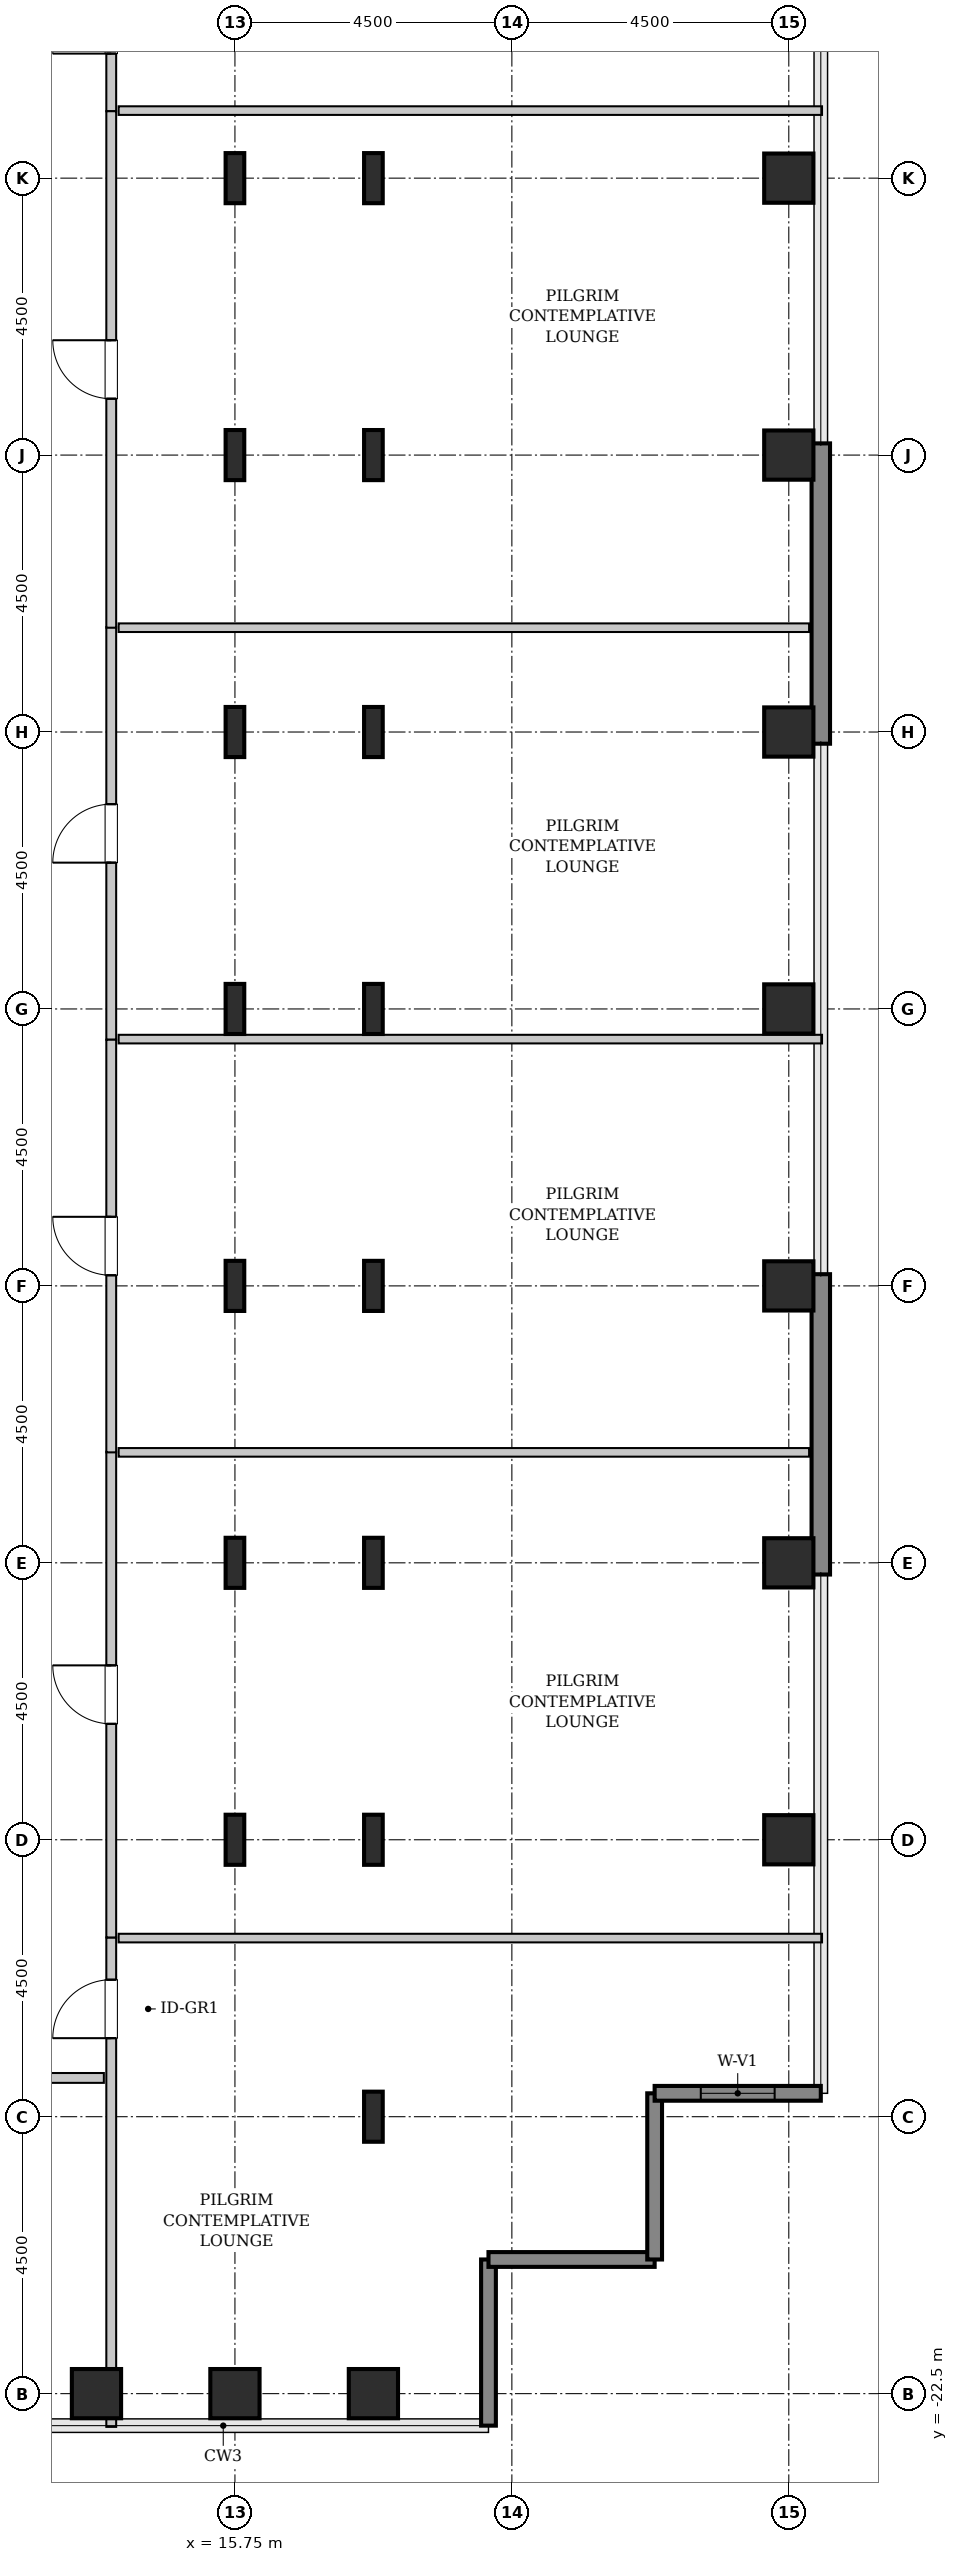
"""IFC4 building model, lengths in metres.
Left out: names, types, materials, properties, quantities, classifications, styles, units other than length and angle.
Written with IfcOpenShell. Run it as: python <this file> out.ifc"""

import sys

from ifc_helpers import new_model, si_unit, direction, frame, frame_2d, origin, origin_2d, place, context, subcontext, project, spatial, rectangle, hollow_rectangle, i_section, extrude, source, transform, mapped, element, fill, save


model = new_model("IFC4")
c1 = context("Model", 3, precision=1e-05, world=origin(), true_north=direction((0.0, 1.0)))
c2 = subcontext(c1, "Body", "Model", "MODEL_VIEW")
j1 = project(units=[si_unit("LENGTHUNIT", "METRE"), si_unit("PLANEANGLEUNIT", "RADIAN")], contexts=[c1])
p1 = place(None, origin())
s1 = spatial("IfcSite", under=j1, at=p1, CompositionType="ELEMENT")
p2 = place(p1, origin())
s2 = spatial("IfcBuilding", under=s1, at=p2, CompositionType="ELEMENT")
p3 = place(p2, frame((0.0, 0.0, 160.2)))
s3 = spatial("IfcBuildingStorey", under=s2, at=p3, CompositionType="ELEMENT", Elevation=160.2)
m1 = source(origin(), c2, "Body", "SweptSolid", [
    extrude(hollow_rectangle(XDim=0.8, YDim=0.8, WallThickness=0.04, InnerFilletRadius=0.04, OuterFilletRadius=0.08, at=origin_2d()), origin(), (0.0, 0.0, 1.0), 3.8),
])
for number, where, z_axis, x_axis in (
    (1, (13.5, -22.5, 0.0), (0.0, 0.0, 1.0), (1.0, 0.0, 0.0)),
    (2, (15.75, -22.5, 0.0), (0.0, 0.0, 1.0), (1.0, 0.0, 0.0)),
):
    element("IfcColumn", number, at=place(p3, frame(where, z_axis=z_axis, x_axis=x_axis)), inside=s3, PredefinedType="COLUMN", context=c2, shape_type="MappedRepresentation", body=[
        mapped(m1, transform((0.0, 0.0, 0.0), x_axis=(1.0, 0.0, 0.0), y_axis=(0.0, 1.0, 0.0), z_axis=(0.0, 0.0, 1.0), scale=1.0)),
    ])
m2 = source(origin(), c2, "Body", "SweptSolid", [
    extrude(i_section(OverallWidth=0.303, OverallDepth=0.814, WebThickness=0.021, FlangeThickness=0.04, FilletRadius=0.03, at=origin_2d()), origin(), (0.0, 0.0, 1.0), 3.8),
])
for number, where, z_axis, x_axis in (
    (3, (15.75, -13.5, 0.0), (0.0, 0.0, 1.0), (1.0, 0.0, 0.0)),
    (4, (15.75, -9.0, 0.0), (0.0, 0.0, 1.0), (1.0, 0.0, 0.0)),
    (5, (15.75, -4.5, 0.0), (0.0, 0.0, 1.0), (1.0, 0.0, 0.0)),
    (6, (15.75, 0.0, 0.0), (0.0, 0.0, 1.0), (1.0, 0.0, 0.0)),
    (7, (15.75, 4.5, 0.0), (0.0, 0.0, 1.0), (1.0, 0.0, 0.0)),
    (8, (15.75, 9.0, 0.0), (0.0, 0.0, 1.0), (1.0, 0.0, 0.0)),
    (9, (15.75, 13.5, 0.0), (0.0, 0.0, 1.0), (1.0, 0.0, 0.0)),
):
    element("IfcColumn", number, at=place(p3, frame(where, z_axis=z_axis, x_axis=x_axis)), inside=s3, PredefinedType="COLUMN", context=c2, shape_type="MappedRepresentation", body=[
        mapped(m2, transform((0.0, 0.0, 0.0), x_axis=(1.0, 0.0, 0.0), y_axis=(0.0, 1.0, 0.0), z_axis=(0.0, 0.0, 1.0), scale=1.0)),
    ])
p4 = place(p3, frame((18.0, -22.5, 0.0), z_axis=(0.0, 0.0, 1.0), x_axis=(1.0, 0.0, 0.0)))
e10 = element("IfcColumn", 10, at=p4, inside=s3, PredefinedType="COLUMN", context=c2, shape_type="MappedRepresentation", body=[
    mapped(m1, transform((0.0, 0.0, 0.0), x_axis=(1.0, 0.0, 0.0), y_axis=(0.0, 1.0, 0.0), z_axis=(0.0, 0.0, 1.0), scale=1.0)),
])
for number, where, z_axis, x_axis in (
    (11, (18.0, -18.0, 0.0), (0.0, 0.0, 1.0), (1.0, 0.0, 0.0)),
    (12, (18.0, -13.5, 0.0), (0.0, 0.0, 1.0), (1.0, 0.0, 0.0)),
    (13, (18.0, -9.0, 0.0), (0.0, 0.0, 1.0), (1.0, 0.0, 0.0)),
    (14, (18.0, -4.5, 0.0), (0.0, 0.0, 1.0), (1.0, 0.0, 0.0)),
    (15, (18.0, 0.0, 0.0), (0.0, 0.0, 1.0), (1.0, 0.0, 0.0)),
    (16, (18.0, 4.5, 0.0), (0.0, 0.0, 1.0), (1.0, 0.0, 0.0)),
    (17, (18.0, 9.0, 0.0), (0.0, 0.0, 1.0), (1.0, 0.0, 0.0)),
    (18, (18.0, 13.5, 0.0), (0.0, 0.0, 1.0), (1.0, 0.0, 0.0)),
):
    element("IfcColumn", number, at=place(p3, frame(where, z_axis=z_axis, x_axis=x_axis)), inside=s3, PredefinedType="COLUMN", context=c2, shape_type="MappedRepresentation", body=[
        mapped(m2, transform((0.0, 0.0, 0.0), x_axis=(1.0, 0.0, 0.0), y_axis=(0.0, 1.0, 0.0), z_axis=(0.0, 0.0, 1.0), scale=1.0)),
    ])
for number, where, z_axis, x_axis in (
    (19, (24.75, -13.5, 0.0), (0.0, 0.0, 1.0), (1.0, 0.0, 0.0)),
    (20, (24.75, -9.0, 0.0), (0.0, 0.0, 1.0), (1.0, 0.0, 0.0)),
    (21, (24.75, -4.5, 0.0), (0.0, 0.0, 1.0), (1.0, 0.0, 0.0)),
    (22, (24.75, 0.0, 0.0), (0.0, 0.0, 1.0), (1.0, 0.0, 0.0)),
    (23, (24.75, 4.5, 0.0), (0.0, 0.0, 1.0), (1.0, 0.0, 0.0)),
    (24, (24.75, 9.0, 0.0), (0.0, 0.0, 1.0), (1.0, 0.0, 0.0)),
    (25, (24.75, 13.5, 0.0), (0.0, 0.0, 1.0), (1.0, 0.0, 0.0)),
):
    element("IfcColumn", number, at=place(p3, frame(where, z_axis=z_axis, x_axis=x_axis)), inside=s3, PredefinedType="COLUMN", context=c2, shape_type="MappedRepresentation", body=[
        mapped(m1, transform((0.0, 0.0, 0.0), x_axis=(1.0, 0.0, 0.0), y_axis=(0.0, 1.0, 0.0), z_axis=(0.0, 0.0, 1.0), scale=1.0)),
    ])
m3 = source(origin(), c2, "Body", "SweptSolid", [
    extrude(rectangle(XDim=4.88, YDim=0.3, at=frame_2d((2.44, 0.0))), origin(), (0.0, 0.0, 1.0), 3.55),
])
for number, where, z_axis, x_axis in (
    (26, (25.27, -9.19, 0.0), (0.0, 0.0, 1.0), (0.0, 1.0, 0.0)),
    (27, (25.27, 4.31, 0.0), (0.0, 0.0, 1.0), (0.0, 1.0, 0.0)),
):
    element("IfcWall", number, at=place(p3, frame(where, z_axis=z_axis, x_axis=x_axis)), inside=s3, PredefinedType="SHEAR", context=c2, shape_type="MappedRepresentation", body=[
        mapped(m3, transform((0.0, 0.0, 0.0), x_axis=(1.0, 0.0, 0.0), y_axis=(0.0, 1.0, 0.0), z_axis=(0.0, 0.0, 1.0), scale=1.0)),
    ])
m4 = source(origin(), c2, "Body", "SweptSolid", [
    extrude(rectangle(XDim=2.7, YDim=0.24, at=frame_2d((1.35, 0.0))), origin(), (0.0, 0.0, 1.0), 3.55),
])
for number, where, z_axis, x_axis in (
    (28, (19.87, -23.02, 0.0), (0.0, 0.0, 1.0), (0.0, 1.0, 0.0)),
    (29, (19.87, -20.32, 0.0), (0.0, 0.0, 1.0), (1.0, 0.0, 0.0)),
    (30, (22.57, -20.32, 0.0), (0.0, 0.0, 1.0), (0.0, 1.0, 0.0)),
):
    element("IfcWall", number, at=place(p3, frame(where, z_axis=z_axis, x_axis=x_axis)), inside=s3, PredefinedType="SHEAR", context=c2, shape_type="MappedRepresentation", body=[
        mapped(m4, transform((0.0, 0.0, 0.0), x_axis=(1.0, 0.0, 0.0), y_axis=(0.0, 1.0, 0.0), z_axis=(0.0, 0.0, 1.0), scale=1.0)),
    ])
p5 = place(p3, frame((22.57, -17.62, 0.0), z_axis=(0.0, 0.0, 1.0), x_axis=(1.0, 0.0, 0.0)))
e31 = element("IfcWall", 31, at=p5, inside=s3, PredefinedType="SHEAR", context=c2, shape_type="MappedRepresentation", body=[
    mapped(m4, transform((0.0, 0.0, 0.0), x_axis=(1.0, 0.0, 0.0), y_axis=(0.0, 1.0, 0.0), z_axis=(0.0, 0.0, 1.0), scale=1.0)),
])
p6 = place(p5, frame((0.75, 0.0, 0.85)))
e32 = element("IfcOpeningElement", 32, at=p6, cuts=e31, PredefinedType="OPENING", context=c2, shape_type="SweptSolid", body=[
    extrude(rectangle(XDim=1.2, YDim=1.8, at=frame_2d((0.6, 0.9))), frame((0.0, 0.13, 0.0), z_axis=(0.0, -1.0, 0.0), x_axis=(1.0, 0.0, 0.0)), (0.0, 0.0, 1.0), 0.26),
])
m5 = source(origin(), c2, "Body", "SweptSolid", [
    extrude(rectangle(XDim=7.953, YDim=0.16, at=frame_2d((3.976, 0.0))), origin(), (0.0, 0.0, 1.0), 3.535),
])
p7 = place(p3, frame((13.74, -23.04, 0.0), z_axis=(0.0, 0.0, 1.0), x_axis=(0.0, 1.0, 0.0)))
e33 = element("IfcWall", 33, at=p7, inside=s3, PredefinedType="PARTITIONING", context=c2, shape_type="MappedRepresentation", body=[
    mapped(m5, transform((0.0, 0.0, 0.0), x_axis=(1.0, 0.0, 0.0), y_axis=(0.0, 1.0, 0.0), z_axis=(0.0, 0.0, 1.0), scale=1.0)),
])
p8 = place(p7, frame((6.316, 0.0, 0.0)))
e34 = element("IfcOpeningElement", 34, at=p8, cuts=e33, PredefinedType="OPENING", context=c2, shape_type="SweptSolid", body=[
    extrude(rectangle(XDim=0.95, YDim=2.1, at=frame_2d((0.475, 1.05))), frame((0.0, 0.09, 0.0), z_axis=(0.0, -1.0, 0.0), x_axis=(1.0, 0.0, 0.0)), (0.0, 0.0, 1.0), 0.18),
])
m6 = source(origin(), c2, "Body", "SweptSolid", [
    extrude(rectangle(XDim=11.43, YDim=0.14, at=frame_2d((5.715, 0.0))), origin(), (0.0, 0.0, 1.0), 3.535),
])
p9 = place(p3, frame((13.86, -15.097, 0.0), z_axis=(0.0, 0.0, 1.0), x_axis=(1.0, 0.0, 0.0)))
e35 = element("IfcWall", 35, at=p9, inside=s3, PredefinedType="PARTITIONING", context=c2, shape_type="MappedRepresentation", body=[
    mapped(m6, transform((0.0, 0.0, 0.0), x_axis=(1.0, 0.0, 0.0), y_axis=(0.0, 1.0, 0.0), z_axis=(0.0, 0.0, 1.0), scale=1.0)),
])
m7 = source(origin(), c2, "Body", "SweptSolid", [
    extrude(rectangle(XDim=7.892, YDim=0.16, at=frame_2d((3.946, 0.0))), origin(), (0.0, 0.0, 1.0), 3.535),
])
p10 = place(p3, frame((13.74, -15.087, 0.0), z_axis=(0.0, 0.0, 1.0), x_axis=(0.0, 1.0, 0.0)))
e36 = element("IfcWall", 36, at=p10, inside=s3, PredefinedType="PARTITIONING", context=c2, shape_type="MappedRepresentation", body=[
    mapped(m7, transform((0.0, 0.0, 0.0), x_axis=(1.0, 0.0, 0.0), y_axis=(0.0, 1.0, 0.0), z_axis=(0.0, 0.0, 1.0), scale=1.0)),
])
p11 = place(p10, frame((3.471, 0.0, 0.0)))
e37 = element("IfcOpeningElement", 37, at=p11, cuts=e36, PredefinedType="OPENING", context=c2, shape_type="SweptSolid", body=[
    extrude(rectangle(XDim=0.95, YDim=2.1, at=frame_2d((0.475, 1.05))), frame((0.0, 0.09, 0.0), z_axis=(0.0, -1.0, 0.0), x_axis=(1.0, 0.0, 0.0)), (0.0, 0.0, 1.0), 0.18),
])
m8 = source(origin(), c2, "Body", "SweptSolid", [
    extrude(rectangle(XDim=11.22, YDim=0.14, at=frame_2d((5.61, 0.0))), origin(), (0.0, 0.0, 1.0), 3.535),
])
p12 = place(p3, frame((13.86, -7.205, 0.0), z_axis=(0.0, 0.0, 1.0), x_axis=(1.0, 0.0, 0.0)))
e38 = element("IfcWall", 38, at=p12, inside=s3, PredefinedType="PARTITIONING", context=c2, shape_type="MappedRepresentation", body=[
    mapped(m8, transform((0.0, 0.0, 0.0), x_axis=(1.0, 0.0, 0.0), y_axis=(0.0, 1.0, 0.0), z_axis=(0.0, 0.0, 1.0), scale=1.0)),
])
m9 = source(origin(), c2, "Body", "SweptSolid", [
    extrude(rectangle(XDim=6.705, YDim=0.16, at=frame_2d((3.353, 0.0))), origin(), (0.0, 0.0, 1.0), 3.535),
])
p13 = place(p3, frame((13.74, -0.5, 0.0), z_axis=(0.0, 0.0, 1.0), x_axis=(0.0, 1.0, 0.0)))
e39 = element("IfcWall", 39, at=p13, inside=s3, PredefinedType="PARTITIONING", context=c2, shape_type="MappedRepresentation", body=[
    mapped(m9, transform((0.0, 0.0, 0.0), x_axis=(1.0, 0.0, 0.0), y_axis=(0.0, 1.0, 0.0), z_axis=(0.0, 0.0, 1.0), scale=1.0)),
])
p14 = place(p13, frame((2.877, 0.0, 0.0)))
e40 = element("IfcOpeningElement", 40, at=p14, cuts=e39, PredefinedType="OPENING", context=c2, shape_type="SweptSolid", body=[
    extrude(rectangle(XDim=0.95, YDim=2.1, at=frame_2d((0.475, 1.05))), frame((0.0, 0.09, 0.0), z_axis=(0.0, -1.0, 0.0), x_axis=(1.0, 0.0, 0.0)), (0.0, 0.0, 1.0), 0.18),
])
p15 = place(p3, frame((13.86, 6.195, 0.0), z_axis=(0.0, 0.0, 1.0), x_axis=(1.0, 0.0, 0.0)))
e41 = element("IfcWall", 41, at=p15, inside=s3, PredefinedType="PARTITIONING", context=c2, shape_type="MappedRepresentation", body=[
    mapped(m8, transform((0.0, 0.0, 0.0), x_axis=(1.0, 0.0, 0.0), y_axis=(0.0, 1.0, 0.0), z_axis=(0.0, 0.0, 1.0), scale=1.0)),
])
m10 = source(origin(), c2, "Body", "SweptSolid", [
    extrude(rectangle(XDim=11.43, YDim=0.14, at=frame_2d((5.715, 0.0))), origin(), (0.0, 0.0, 1.0), 2.875),
])
p16 = place(p3, frame((13.86, -0.49, 0.0), z_axis=(0.0, 0.0, 1.0), x_axis=(1.0, 0.0, 0.0)))
e42 = element("IfcWall", 42, at=p16, inside=s3, PredefinedType="PARTITIONING", context=c2, shape_type="MappedRepresentation", body=[
    mapped(m10, transform((0.0, 0.0, 0.0), x_axis=(1.0, 0.0, 0.0), y_axis=(0.0, 1.0, 0.0), z_axis=(0.0, 0.0, 1.0), scale=1.0)),
])
p17 = place(p3, frame((13.74, -7.205, 0.0), z_axis=(0.0, 0.0, 1.0), x_axis=(0.0, 1.0, 0.0)))
e43 = element("IfcWall", 43, at=p17, inside=s3, PredefinedType="PARTITIONING", context=c2, shape_type="MappedRepresentation", body=[
    mapped(m9, transform((0.0, 0.0, 0.0), x_axis=(1.0, 0.0, 0.0), y_axis=(0.0, 1.0, 0.0), z_axis=(0.0, 0.0, 1.0), scale=1.0)),
])
p18 = place(p17, frame((2.877, 0.0, 0.0)))
e44 = element("IfcOpeningElement", 44, at=p18, cuts=e43, PredefinedType="OPENING", context=c2, shape_type="SweptSolid", body=[
    extrude(rectangle(XDim=0.95, YDim=2.1, at=frame_2d((0.475, 1.05))), frame((0.0, 0.09, 0.0), z_axis=(0.0, -1.0, 0.0), x_axis=(1.0, 0.0, 0.0)), (0.0, 0.0, 1.0), 0.18),
])
m11 = source(origin(), c2, "Body", "SweptSolid", [
    extrude(rectangle(XDim=8.453, YDim=0.16, at=frame_2d((4.226, 0.0))), origin(), (0.0, 0.0, 1.0), 3.535),
])
p19 = place(p3, frame((13.74, 14.587, 0.0), z_axis=(0.0, 0.0, 1.0), x_axis=(0.0, 1.0, 0.0)))
e45 = element("IfcWall", 45, at=p19, inside=s3, PredefinedType="PARTITIONING", context=c2, shape_type="MappedRepresentation", body=[
    mapped(m11, transform((0.0, 0.0, 0.0), x_axis=(1.0, 0.0, 0.0), y_axis=(0.0, 1.0, 0.0), z_axis=(0.0, 0.0, 1.0), scale=1.0)),
])
p20 = place(p19, frame((0.936, 0.0, 0.0)))
e46 = element("IfcOpeningElement", 46, at=p20, cuts=e45, PredefinedType="OPENING", context=c2, shape_type="SweptSolid", body=[
    extrude(rectangle(XDim=0.95, YDim=2.1, at=frame_2d((0.475, 1.05))), frame((0.0, 0.09, 0.0), z_axis=(0.0, -1.0, 0.0), x_axis=(1.0, 0.0, 0.0)), (0.0, 0.0, 1.0), 0.18),
])
p21 = place(p3, frame((13.86, 14.597, 0.0), z_axis=(0.0, 0.0, 1.0), x_axis=(1.0, 0.0, 0.0)))
e47 = element("IfcWall", 47, at=p21, inside=s3, PredefinedType="PARTITIONING", context=c2, shape_type="MappedRepresentation", body=[
    mapped(m6, transform((0.0, 0.0, 0.0), x_axis=(1.0, 0.0, 0.0), y_axis=(0.0, 1.0, 0.0), z_axis=(0.0, 0.0, 1.0), scale=1.0)),
])
m12 = source(origin(), c2, "Body", "SweptSolid", [
    extrude(rectangle(XDim=8.392, YDim=0.16, at=frame_2d((4.196, 0.0))), origin(), (0.0, 0.0, 1.0), 3.535),
])
p22 = place(p3, frame((13.74, 6.195, 0.0), z_axis=(0.0, 0.0, 1.0), x_axis=(0.0, 1.0, 0.0)))
e48 = element("IfcWall", 48, at=p22, inside=s3, PredefinedType="PARTITIONING", context=c2, shape_type="MappedRepresentation", body=[
    mapped(m12, transform((0.0, 0.0, 0.0), x_axis=(1.0, 0.0, 0.0), y_axis=(0.0, 1.0, 0.0), z_axis=(0.0, 0.0, 1.0), scale=1.0)),
])
p23 = place(p22, frame((3.721, 0.0, 0.0)))
e49 = element("IfcOpeningElement", 49, at=p23, cuts=e48, PredefinedType="OPENING", context=c2, shape_type="SweptSolid", body=[
    extrude(rectangle(XDim=0.95, YDim=2.1, at=frame_2d((0.475, 1.05))), frame((0.0, 0.09, 0.0), z_axis=(0.0, -1.0, 0.0), x_axis=(1.0, 0.0, 0.0)), (0.0, 0.0, 1.0), 0.18),
])
m13 = source(origin(), c2, "Body", "SweptSolid", [
    extrude(rectangle(XDim=6.025, YDim=0.16, at=frame_2d((3.013, 0.0))), origin(), (0.0, 0.0, 1.0), 3.535),
])
p24 = place(p3, frame((7.595, -17.37, 0.0), z_axis=(0.0, 0.0, 1.0), x_axis=(1.0, 0.0, 0.0)))
e50 = element("IfcWall", 50, at=p24, inside=s3, PredefinedType="PARTITIONING", context=c2, shape_type="MappedRepresentation", body=[
    mapped(m13, transform((0.0, 0.0, 0.0), x_axis=(1.0, 0.0, 0.0), y_axis=(0.0, 1.0, 0.0), z_axis=(0.0, 0.0, 1.0), scale=1.0)),
])
p25 = place(p24, frame((2.176, 0.0, 0.0)))
e51 = element("IfcOpeningElement", 51, at=p25, cuts=e50, PredefinedType="OPENING", context=c2, shape_type="SweptSolid", body=[
    extrude(rectangle(XDim=0.95, YDim=2.1, at=frame_2d((0.475, 1.05))), frame((0.0, 0.09, 0.0), z_axis=(0.0, -1.0, 0.0), x_axis=(1.0, 0.0, 0.0)), (0.0, 0.0, 1.0), 0.18),
])
m14 = source(origin(), c2, "Body", "SweptSolid", [
    extrude(rectangle(XDim=1.2, YDim=1.8, at=frame_2d((0.6, 0.9))), frame((0.0, 0.03, 0.0), z_axis=(0.0, -1.0, 0.0), x_axis=(1.0, 0.0, 0.0)), (0.0, 0.0, 1.0), 0.06),
])
p26 = place(p6, origin())
e52 = element("IfcWindow", 52, at=p26, inside=s3, PartitioningType="SINGLE_PANEL", PredefinedType="WINDOW", context=c2, shape_type="MappedRepresentation", body=[
    mapped(m14, transform((0.0, 0.0, 0.0), x_axis=(1.0, 0.0, 0.0), y_axis=(0.0, 1.0, 0.0), z_axis=(0.0, 0.0, 1.0), scale=1.0)),
])
fill(e32, e52)
m15 = source(origin(), c2, "Body", "SweptSolid", [
    extrude(rectangle(XDim=0.95, YDim=2.1, at=frame_2d((0.475, 1.05))), frame((0.0, 0.025, 0.0), z_axis=(0.0, -1.0, 0.0), x_axis=(1.0, 0.0, 0.0)), (0.0, 0.0, 1.0), 0.05),
])
p27 = place(p8, origin())
e53 = element("IfcDoor", 53, at=p27, inside=s3, OperationType="SINGLE_SWING_LEFT", PredefinedType="DOOR", context=c2, shape_type="MappedRepresentation", body=[
    mapped(m15, transform((0.0, 0.0, 0.0), x_axis=(1.0, 0.0, 0.0), y_axis=(0.0, 1.0, 0.0), z_axis=(0.0, 0.0, 1.0), scale=1.0)),
])
fill(e34, e53)
p28 = place(p11, origin())
e54 = element("IfcDoor", 54, at=p28, inside=s3, OperationType="SINGLE_SWING_RIGHT", PredefinedType="DOOR", context=c2, shape_type="MappedRepresentation", body=[
    mapped(m15, transform((0.0, 0.0, 0.0), x_axis=(1.0, 0.0, 0.0), y_axis=(0.0, 1.0, 0.0), z_axis=(0.0, 0.0, 1.0), scale=1.0)),
])
fill(e37, e54)
p29 = place(p14, origin())
e55 = element("IfcDoor", 55, at=p29, inside=s3, OperationType="SINGLE_SWING_LEFT", PredefinedType="DOOR", context=c2, shape_type="MappedRepresentation", body=[
    mapped(m15, transform((0.0, 0.0, 0.0), x_axis=(1.0, 0.0, 0.0), y_axis=(0.0, 1.0, 0.0), z_axis=(0.0, 0.0, 1.0), scale=1.0)),
])
fill(e40, e55)
p30 = place(p18, origin())
e56 = element("IfcDoor", 56, at=p30, inside=s3, OperationType="SINGLE_SWING_RIGHT", PredefinedType="DOOR", context=c2, shape_type="MappedRepresentation", body=[
    mapped(m15, transform((0.0, 0.0, 0.0), x_axis=(1.0, 0.0, 0.0), y_axis=(0.0, 1.0, 0.0), z_axis=(0.0, 0.0, 1.0), scale=1.0)),
])
fill(e44, e56)
p31 = place(p20, origin())
e57 = element("IfcDoor", 57, at=p31, inside=s3, OperationType="SINGLE_SWING_LEFT", PredefinedType="DOOR", context=c2, shape_type="MappedRepresentation", body=[
    mapped(m15, transform((0.0, 0.0, 0.0), x_axis=(1.0, 0.0, 0.0), y_axis=(0.0, 1.0, 0.0), z_axis=(0.0, 0.0, 1.0), scale=1.0)),
])
fill(e46, e57)
p32 = place(p23, origin())
e58 = element("IfcDoor", 58, at=p32, inside=s3, OperationType="SINGLE_SWING_RIGHT", PredefinedType="DOOR", context=c2, shape_type="MappedRepresentation", body=[
    mapped(m15, transform((0.0, 0.0, 0.0), x_axis=(1.0, 0.0, 0.0), y_axis=(0.0, 1.0, 0.0), z_axis=(0.0, 0.0, 1.0), scale=1.0)),
])
fill(e49, e58)
save(model, sys.argv[1])
